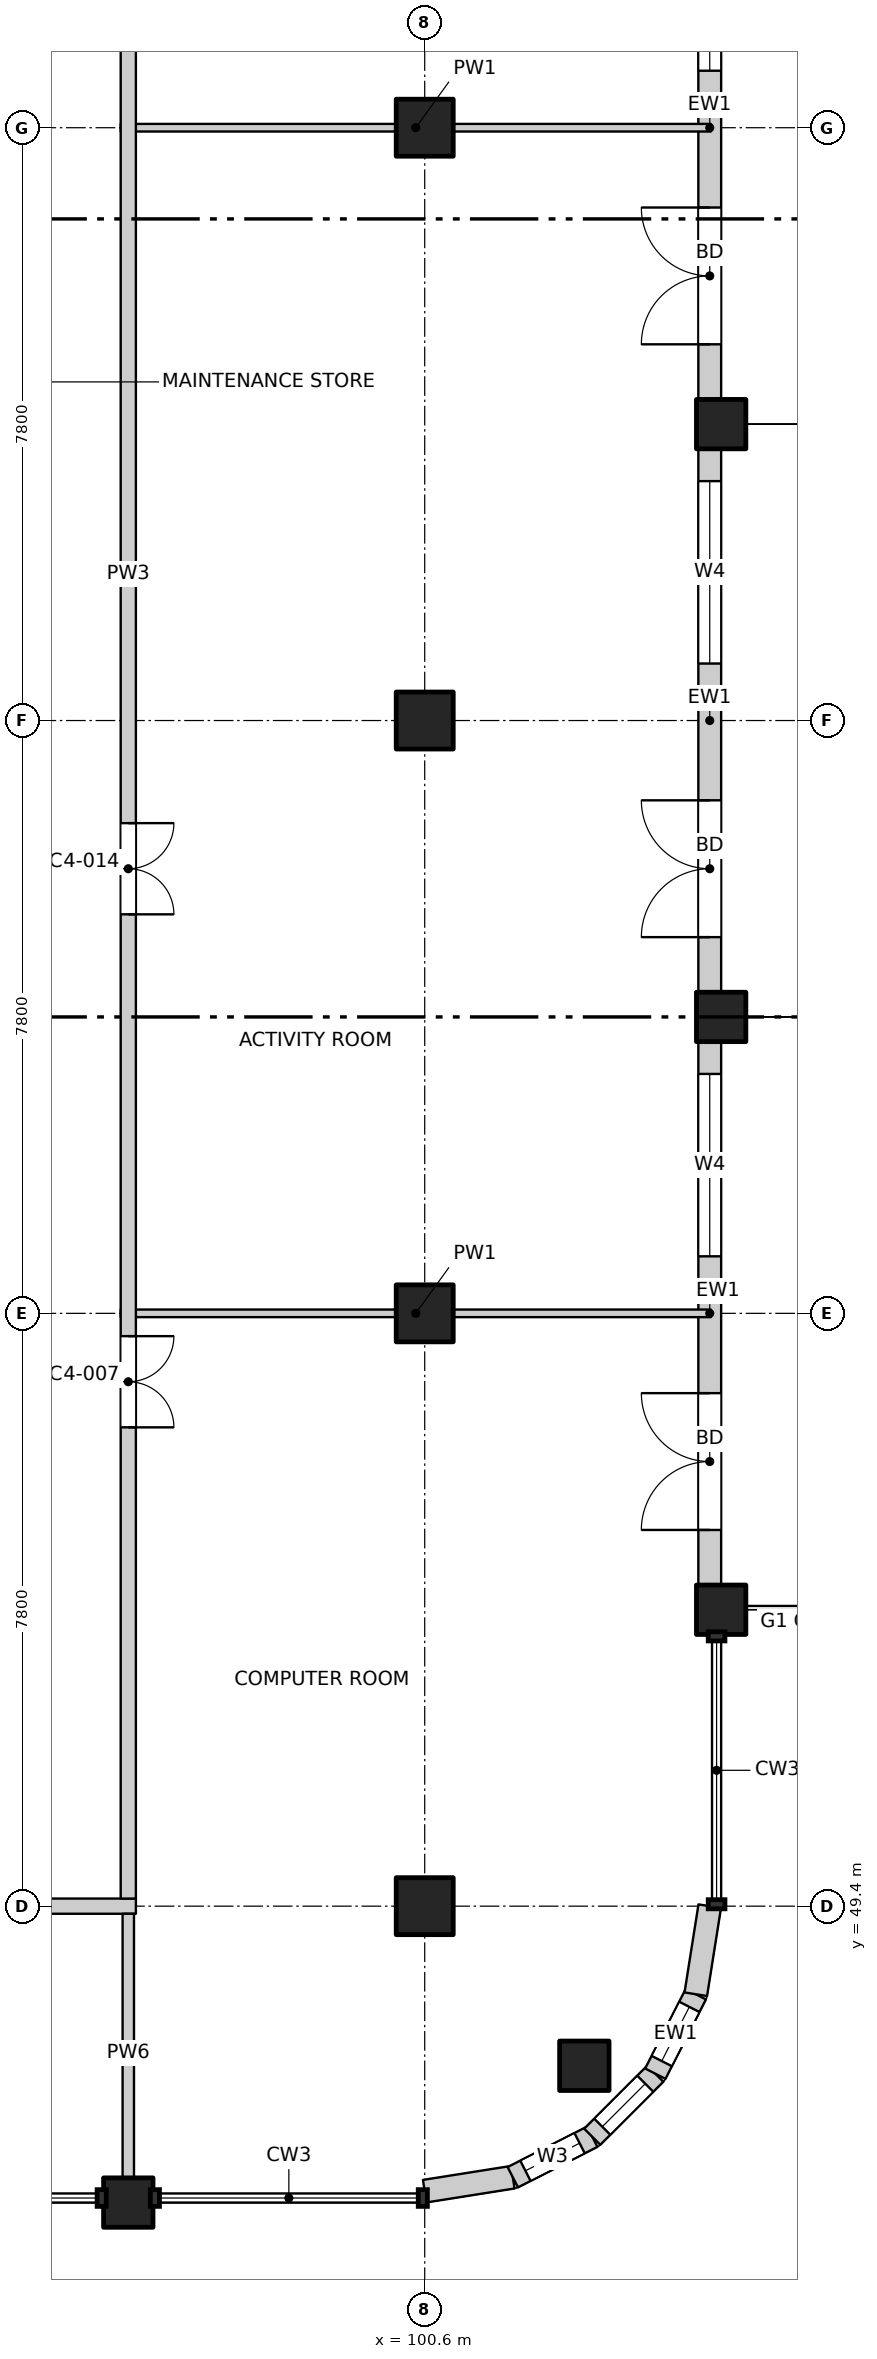
"""IFC4 building model, lengths in metres.
Left out: names, types, materials, properties, quantities, classifications, styles, units other than length and angle.
Written with IfcOpenShell. Run it as: python <this file> out.ifc"""

import sys

from ifc_helpers import new_model, si_unit, direction, frame, frame_2d, origin, origin_2d, place, context, subcontext, project, spatial, rectangle, extrude, element, fill, save


model = new_model("IFC4")
c1 = context("Model", 3, precision=1e-05, world=origin(), true_north=direction((0.0, 1.0)))
c2 = subcontext(c1, "Body", "Model", "MODEL_VIEW")
j1 = project(units=[si_unit("LENGTHUNIT", "METRE"), si_unit("PLANEANGLEUNIT", "RADIAN")], contexts=[c1])
p1 = place(None, origin())
s1 = spatial("IfcSite", under=j1, at=p1, CompositionType="ELEMENT")
p2 = place(p1, origin())
s2 = spatial("IfcBuilding", under=s1, at=p2, CompositionType="ELEMENT")
p3 = place(p2, frame((0.0, 0.0, 256.2)))
s3 = spatial("IfcBuildingStorey", under=s2, at=p3, CompositionType="ELEMENT", Elevation=256.2)
for number, where, z_axis, x_axis in (
    (1, (102.7, 47.3, -0.25), (0.0, 0.0, 1.0), (1.0, 0.0, 0.0)),
    (2, (104.5, 53.3, -0.25), (0.0, 0.0, 1.0), (1.0, 0.0, 0.0)),
    (3, (104.5, 61.1, -0.25), (0.0, 0.0, 1.0), (1.0, 0.0, 0.0)),
    (4, (104.5, 68.9, -0.25), (0.0, 0.0, 1.0), (1.0, 0.0, 0.0)),
    (5, (96.7, 45.5, -0.25), (0.0, 0.0, 1.0), (1.0, 0.0, 0.0)),
):
    element("IfcColumn", number, at=place(p3, frame(where, z_axis=z_axis, x_axis=x_axis)), inside=s3, PredefinedType="COLUMN", context=c2, shape_type="SweptSolid", body=[
        extrude(rectangle(XDim=0.65, YDim=0.65, at=origin_2d()), origin(), (0.0, 0.0, 1.0), 3.4),
    ])
for number, where, z_axis, x_axis in (
    (6, (100.6, 49.4, -0.25), (0.0, 0.0, 1.0), (1.0, 0.0, 0.0)),
    (7, (100.6, 57.2, -0.25), (0.0, 0.0, 1.0), (1.0, 0.0, 0.0)),
    (8, (100.6, 65.0, -0.25), (0.0, 0.0, 1.0), (1.0, 0.0, 0.0)),
    (9, (100.6, 72.8, -0.25), (0.0, 0.0, 1.0), (1.0, 0.0, 0.0)),
):
    element("IfcColumn", number, at=place(p3, frame(where, z_axis=z_axis, x_axis=x_axis)), inside=s3, PredefinedType="COLUMN", context=c2, shape_type="SweptSolid", body=[
        extrude(rectangle(XDim=0.75, YDim=0.75, at=origin_2d()), origin(), (0.0, 0.0, 1.0), 3.4),
    ])
p4 = place(p3, frame((104.35, 53.625, 0.0), z_axis=(0.0, 0.0, 1.0), x_axis=(0.0, 1.0, 0.0)))
e10 = element("IfcWall", 10, at=p4, inside=s3, PredefinedType="SOLIDWALL", context=c2, shape_type="SweptSolid", body=[
    extrude(rectangle(XDim=7.15, YDim=0.3, at=frame_2d((3.575, 0.0))), origin(), (0.0, 0.0, 1.0), 2.7),
])
p5 = place(p4, frame((0.725, 0.0, 0.0)))
e11 = element("IfcOpeningElement", 11, at=p5, cuts=e10, PredefinedType="OPENING", context=c2, shape_type="SweptSolid", body=[
    extrude(rectangle(XDim=1.8, YDim=2.4, at=frame_2d((0.9, 1.2))), frame((0.0, 0.16, 0.0), z_axis=(0.0, -1.0, 0.0), x_axis=(1.0, 0.0, 0.0)), (0.0, 0.0, 1.0), 0.32),
])
p6 = place(p4, frame((4.325, 0.0, 0.6)))
e12 = element("IfcOpeningElement", 12, at=p6, cuts=e10, PredefinedType="OPENING", context=c2, shape_type="SweptSolid", body=[
    extrude(rectangle(XDim=2.4, YDim=2.1, at=frame_2d((1.2, 1.05))), frame((0.0, 0.16, 0.0), z_axis=(0.0, -1.0, 0.0), x_axis=(1.0, 0.0, 0.0)), (0.0, 0.0, 1.0), 0.32),
])
p7 = place(p3, frame((104.35, 61.425, 0.0), z_axis=(0.0, 0.0, 1.0), x_axis=(0.0, 1.0, 0.0)))
e13 = element("IfcWall", 13, at=p7, inside=s3, PredefinedType="SOLIDWALL", context=c2, shape_type="SweptSolid", body=[
    extrude(rectangle(XDim=7.15, YDim=0.3, at=frame_2d((3.575, 0.0))), origin(), (0.0, 0.0, 1.0), 2.7),
])
p8 = place(p7, frame((0.725, 0.0, 0.0)))
e14 = element("IfcOpeningElement", 14, at=p8, cuts=e13, PredefinedType="OPENING", context=c2, shape_type="SweptSolid", body=[
    extrude(rectangle(XDim=1.8, YDim=2.4, at=frame_2d((0.9, 1.2))), frame((0.0, 0.16, 0.0), z_axis=(0.0, -1.0, 0.0), x_axis=(1.0, 0.0, 0.0)), (0.0, 0.0, 1.0), 0.32),
])
p9 = place(p7, frame((4.325, 0.0, 0.6)))
e15 = element("IfcOpeningElement", 15, at=p9, cuts=e13, PredefinedType="OPENING", context=c2, shape_type="SweptSolid", body=[
    extrude(rectangle(XDim=2.4, YDim=2.1, at=frame_2d((1.2, 1.05))), frame((0.0, 0.16, 0.0), z_axis=(0.0, -1.0, 0.0), x_axis=(1.0, 0.0, 0.0)), (0.0, 0.0, 1.0), 0.32),
])
p10 = place(p3, frame((104.35, 69.225, 0.0), z_axis=(0.0, 0.0, 1.0), x_axis=(0.0, 1.0, 0.0)))
e16 = element("IfcWall", 16, at=p10, inside=s3, PredefinedType="SOLIDWALL", context=c2, shape_type="SweptSolid", body=[
    extrude(rectangle(XDim=7.15, YDim=0.3, at=frame_2d((3.575, 0.0))), origin(), (0.0, 0.0, 1.0), 2.7),
])
p11 = place(p10, frame((0.725, 0.0, 0.0)))
e17 = element("IfcOpeningElement", 17, at=p11, cuts=e16, PredefinedType="OPENING", context=c2, shape_type="SweptSolid", body=[
    extrude(rectangle(XDim=1.8, YDim=2.4, at=frame_2d((0.9, 1.2))), frame((0.0, 0.16, 0.0), z_axis=(0.0, -1.0, 0.0), x_axis=(1.0, 0.0, 0.0)), (0.0, 0.0, 1.0), 0.32),
])
p12 = place(p10, frame((4.325, 0.0, 0.6)))
e18 = element("IfcOpeningElement", 18, at=p12, cuts=e16, PredefinedType="OPENING", context=c2, shape_type="SweptSolid", body=[
    extrude(rectangle(XDim=2.4, YDim=2.1, at=frame_2d((1.2, 1.05))), frame((0.0, 0.16, 0.0), z_axis=(0.0, -1.0, 0.0), x_axis=(1.0, 0.0, 0.0)), (0.0, 0.0, 1.0), 0.32),
])
p13 = place(p3, frame((100.6, 45.65, 0.0), z_axis=(0.0, 0.0, 1.0), x_axis=(0.987678452879, 0.156496880861, 0.0)))
e19 = element("IfcWall", 19, at=p13, inside=s3, PredefinedType="SOLIDWALL", context=c2, shape_type="SweptSolid", body=[
    extrude(rectangle(XDim=1.173, YDim=0.3, at=frame_2d((0.586, 0.0))), origin(), (0.0, 0.0, 1.0), 2.7),
])
p14 = place(p3, frame((101.759, 45.833, 0.0), z_axis=(0.0, 0.0, 1.0), x_axis=(0.890988677504, 0.454025524128, 0.0)))
e20 = element("IfcWall", 20, at=p14, inside=s3, PredefinedType="SOLIDWALL", context=c2, shape_type="SweptSolid", body=[
    extrude(rectangle(XDim=1.173, YDim=0.3, at=frame_2d((0.587, 0.0))), origin(), (0.0, 0.0, 1.0), 2.7),
])
p15 = place(p14, frame((0.187, 0.0, 0.9)))
e21 = element("IfcOpeningElement", 21, at=p15, cuts=e20, PredefinedType="OPENING", context=c2, shape_type="SweptSolid", body=[
    extrude(rectangle(XDim=0.8, YDim=1.2, at=frame_2d((0.4, 0.6))), frame((0.0, 0.16, 0.0), z_axis=(0.0, -1.0, 0.0), x_axis=(1.0, 0.0, 0.0)), (0.0, 0.0, 1.0), 0.32),
])
p16 = place(p3, frame((102.804, 46.366, 0.0), z_axis=(0.0, 0.0, 1.0), x_axis=(0.707106781187, 0.707106781187, 0.0)))
e22 = element("IfcWall", 22, at=p16, inside=s3, PredefinedType="SOLIDWALL", context=c2, shape_type="SweptSolid", body=[
    extrude(rectangle(XDim=1.173, YDim=0.3, at=frame_2d((0.586, 0.0))), origin(), (0.0, 0.0, 1.0), 2.7),
])
p17 = place(p16, frame((0.187, 0.0, 0.9)))
e23 = element("IfcOpeningElement", 23, at=p17, cuts=e22, PredefinedType="OPENING", context=c2, shape_type="SweptSolid", body=[
    extrude(rectangle(XDim=0.8, YDim=1.2, at=frame_2d((0.4, 0.6))), frame((0.0, 0.16, 0.0), z_axis=(0.0, -1.0, 0.0), x_axis=(1.0, 0.0, 0.0)), (0.0, 0.0, 1.0), 0.32),
])
p18 = place(p3, frame((103.634, 47.196, 0.0), z_axis=(0.0, 0.0, 1.0), x_axis=(0.454025524128, 0.890988677504, 0.0)))
e24 = element("IfcWall", 24, at=p18, inside=s3, PredefinedType="SOLIDWALL", context=c2, shape_type="SweptSolid", body=[
    extrude(rectangle(XDim=1.173, YDim=0.3, at=frame_2d((0.587, 0.0))), origin(), (0.0, 0.0, 1.0), 2.7),
])
p19 = place(p18, frame((0.187, 0.0, 0.9)))
e25 = element("IfcOpeningElement", 25, at=p19, cuts=e24, PredefinedType="OPENING", context=c2, shape_type="SweptSolid", body=[
    extrude(rectangle(XDim=0.8, YDim=1.2, at=frame_2d((0.4, 0.6))), frame((0.0, 0.16, 0.0), z_axis=(0.0, -1.0, 0.0), x_axis=(1.0, 0.0, 0.0)), (0.0, 0.0, 1.0), 0.32),
])
p20 = place(p3, frame((104.167, 48.241, 0.0), z_axis=(0.0, 0.0, 1.0), x_axis=(0.156496880861, 0.987678452879, 0.0)))
e26 = element("IfcWall", 26, at=p20, inside=s3, PredefinedType="SOLIDWALL", context=c2, shape_type="SweptSolid", body=[
    extrude(rectangle(XDim=1.173, YDim=0.3, at=frame_2d((0.586, 0.0))), origin(), (0.0, 0.0, 1.0), 2.7),
])
p21 = place(p3, frame((73.2, 49.4, 0.0), z_axis=(0.0, 0.0, 1.0), x_axis=(1.0, 0.0, 0.0)))
e27 = element("IfcWall", 27, at=p21, inside=s3, PredefinedType="PARTITIONING", context=c2, shape_type="SweptSolid", body=[
    extrude(rectangle(XDim=23.6, YDim=0.2, at=frame_2d((11.8, 0.0))), origin(), (0.0, 0.0, 1.0), 3.15),
])
p22 = place(p21, frame((5.35, 0.0, 0.0)))
e28 = element("IfcOpeningElement", 28, at=p22, cuts=e27, PredefinedType="OPENING", context=c2, shape_type="SweptSolid", body=[
    extrude(rectangle(XDim=1.2, YDim=2.1, at=frame_2d((0.6, 1.05))), frame((0.0, 0.11, 0.0), z_axis=(0.0, -1.0, 0.0), x_axis=(1.0, 0.0, 0.0)), (0.0, 0.0, 1.0), 0.22),
])
p23 = place(p21, frame((17.05, 0.0, 0.0)))
e29 = element("IfcOpeningElement", 29, at=p23, cuts=e27, PredefinedType="OPENING", context=c2, shape_type="SweptSolid", body=[
    extrude(rectangle(XDim=1.2, YDim=2.1, at=frame_2d((0.6, 1.05))), frame((0.0, 0.11, 0.0), z_axis=(0.0, -1.0, 0.0), x_axis=(1.0, 0.0, 0.0)), (0.0, 0.0, 1.0), 0.22),
])
for number, where, z_axis, x_axis in (
    (30, (96.6, 57.2, 0.0), (0.0, 0.0, 1.0), (1.0, 0.0, 0.0)),
    (31, (96.6, 72.8, 0.0), (0.0, 0.0, 1.0), (1.0, 0.0, 0.0)),
):
    element("IfcWall", number, at=place(p3, frame(where, z_axis=z_axis, x_axis=x_axis)), inside=s3, PredefinedType="PARTITIONING", context=c2, shape_type="SweptSolid", body=[
        extrude(rectangle(XDim=7.765, YDim=0.1, at=frame_2d((3.882, 0.0))), origin(), (0.0, 0.0, 1.0), 3.15),
    ])
p24 = place(p3, frame((96.7, 45.635, 0.0), z_axis=(0.0, 0.0, 1.0), x_axis=(0.0, 1.0, 0.0)))
e32 = element("IfcWall", 32, at=p24, inside=s3, PredefinedType="PARTITIONING", context=c2, shape_type="SweptSolid", body=[
    extrude(rectangle(XDim=3.665, YDim=0.15, at=frame_2d((1.833, 0.0))), origin(), (0.0, 0.0, 1.0), 3.15),
])
p25 = place(p3, frame((96.7, 49.5, 0.0), z_axis=(0.0, 0.0, 1.0), x_axis=(0.0, 1.0, 0.0)))
e33 = element("IfcWall", 33, at=p25, inside=s3, PredefinedType="PARTITIONING", context=c2, shape_type="SweptSolid", body=[
    extrude(rectangle(XDim=34.865, YDim=0.2, at=frame_2d((17.433, 0.0))), origin(), (0.0, 0.0, 1.0), 3.15),
])
p26 = place(p25, frame((6.2, 0.0, 0.0)))
e34 = element("IfcOpeningElement", 34, at=p26, cuts=e33, PredefinedType="OPENING", context=c2, shape_type="SweptSolid", body=[
    extrude(rectangle(XDim=1.2, YDim=2.1, at=frame_2d((0.6, 1.05))), frame((0.0, 0.11, 0.0), z_axis=(0.0, -1.0, 0.0), x_axis=(1.0, 0.0, 0.0)), (0.0, 0.0, 1.0), 0.22),
])
p27 = place(p25, frame((12.95, 0.0, 0.0)))
e35 = element("IfcOpeningElement", 35, at=p27, cuts=e33, PredefinedType="OPENING", context=c2, shape_type="SweptSolid", body=[
    extrude(rectangle(XDim=1.2, YDim=2.1, at=frame_2d((0.6, 1.05))), frame((0.0, 0.11, 0.0), z_axis=(0.0, -1.0, 0.0), x_axis=(1.0, 0.0, 0.0)), (0.0, 0.0, 1.0), 0.22),
])
p28 = place(p25, frame((28.55, 0.0, 0.0)))
e36 = element("IfcOpeningElement", 36, at=p28, cuts=e33, PredefinedType="OPENING", context=c2, shape_type="SweptSolid", body=[
    extrude(rectangle(XDim=1.2, YDim=2.1, at=frame_2d((0.6, 1.05))), frame((0.0, 0.11, 0.0), z_axis=(0.0, -1.0, 0.0), x_axis=(1.0, 0.0, 0.0)), (0.0, 0.0, 1.0), 0.22),
])
p29 = place(p25, frame((31.825, 0.0, 0.0)))
e37 = element("IfcOpeningElement", 37, at=p29, cuts=e33, PredefinedType="OPENING", context=c2, shape_type="SweptSolid", body=[
    extrude(rectangle(XDim=1.2, YDim=2.1, at=frame_2d((0.6, 1.05))), frame((0.0, 0.11, 0.0), z_axis=(0.0, -1.0, 0.0), x_axis=(1.0, 0.0, 0.0)), (0.0, 0.0, 1.0), 0.22),
])
p30 = place(p25, frame((33.65, 0.0, 0.0)))
e38 = element("IfcOpeningElement", 38, at=p30, cuts=e33, PredefinedType="OPENING", context=c2, shape_type="SweptSolid", body=[
    extrude(rectangle(XDim=0.9, YDim=2.1, at=frame_2d((0.45, 1.05))), frame((0.0, 0.11, 0.0), z_axis=(0.0, -1.0, 0.0), x_axis=(1.0, 0.0, 0.0)), (0.0, 0.0, 1.0), 0.22),
])
p31 = place(p5, origin())
e39 = element("IfcDoor", 39, at=p31, inside=s3, OperationType="DOUBLE_DOOR_SINGLE_SWING", PredefinedType="DOOR", context=c2, shape_type="SweptSolid", body=[
    extrude(rectangle(XDim=1.8, YDim=2.4, at=frame_2d((0.9, 1.2))), frame((0.0, 0.025, 0.0), z_axis=(0.0, -1.0, 0.0), x_axis=(1.0, 0.0, 0.0)), (0.0, 0.0, 1.0), 0.05),
])
fill(e11, e39)
p32 = place(p6, origin())
e40 = element("IfcWindow", 40, at=p32, inside=s3, PartitioningType="SINGLE_PANEL", PredefinedType="WINDOW", context=c2, shape_type="SweptSolid", body=[
    extrude(rectangle(XDim=2.4, YDim=2.1, at=frame_2d((1.2, 1.05))), frame((0.0, 0.03, 0.0), z_axis=(0.0, -1.0, 0.0), x_axis=(1.0, 0.0, 0.0)), (0.0, 0.0, 1.0), 0.06),
])
fill(e12, e40)
p33 = place(p8, origin())
e41 = element("IfcDoor", 41, at=p33, inside=s3, OperationType="DOUBLE_DOOR_SINGLE_SWING", PredefinedType="DOOR", context=c2, shape_type="SweptSolid", body=[
    extrude(rectangle(XDim=1.8, YDim=2.4, at=frame_2d((0.9, 1.2))), frame((0.0, 0.025, 0.0), z_axis=(0.0, -1.0, 0.0), x_axis=(1.0, 0.0, 0.0)), (0.0, 0.0, 1.0), 0.05),
])
fill(e14, e41)
p34 = place(p9, origin())
e42 = element("IfcWindow", 42, at=p34, inside=s3, PartitioningType="SINGLE_PANEL", PredefinedType="WINDOW", context=c2, shape_type="SweptSolid", body=[
    extrude(rectangle(XDim=2.4, YDim=2.1, at=frame_2d((1.2, 1.05))), frame((0.0, 0.03, 0.0), z_axis=(0.0, -1.0, 0.0), x_axis=(1.0, 0.0, 0.0)), (0.0, 0.0, 1.0), 0.06),
])
fill(e15, e42)
p35 = place(p11, origin())
e43 = element("IfcDoor", 43, at=p35, inside=s3, OperationType="DOUBLE_DOOR_SINGLE_SWING", PredefinedType="DOOR", context=c2, shape_type="SweptSolid", body=[
    extrude(rectangle(XDim=1.8, YDim=2.4, at=frame_2d((0.9, 1.2))), frame((0.0, 0.025, 0.0), z_axis=(0.0, -1.0, 0.0), x_axis=(1.0, 0.0, 0.0)), (0.0, 0.0, 1.0), 0.05),
])
fill(e17, e43)
p36 = place(p12, origin())
e44 = element("IfcWindow", 44, at=p36, inside=s3, PartitioningType="SINGLE_PANEL", PredefinedType="WINDOW", context=c2, shape_type="SweptSolid", body=[
    extrude(rectangle(XDim=2.4, YDim=2.1, at=frame_2d((1.2, 1.05))), frame((0.0, 0.03, 0.0), z_axis=(0.0, -1.0, 0.0), x_axis=(1.0, 0.0, 0.0)), (0.0, 0.0, 1.0), 0.06),
])
fill(e18, e44)
p37 = place(p15, origin())
e45 = element("IfcWindow", 45, at=p37, inside=s3, PartitioningType="SINGLE_PANEL", PredefinedType="WINDOW", context=c2, shape_type="SweptSolid", body=[
    extrude(rectangle(XDim=0.8, YDim=1.2, at=frame_2d((0.4, 0.6))), frame((0.0, 0.03, 0.0), z_axis=(0.0, -1.0, 0.0), x_axis=(1.0, 0.0, 0.0)), (0.0, 0.0, 1.0), 0.06),
])
fill(e21, e45)
p38 = place(p17, origin())
e46 = element("IfcWindow", 46, at=p38, inside=s3, PartitioningType="SINGLE_PANEL", PredefinedType="WINDOW", context=c2, shape_type="SweptSolid", body=[
    extrude(rectangle(XDim=0.8, YDim=1.2, at=frame_2d((0.4, 0.6))), frame((0.0, 0.03, 0.0), z_axis=(0.0, -1.0, 0.0), x_axis=(1.0, 0.0, 0.0)), (0.0, 0.0, 1.0), 0.06),
])
fill(e23, e46)
p39 = place(p19, origin())
e47 = element("IfcWindow", 47, at=p39, inside=s3, PartitioningType="SINGLE_PANEL", PredefinedType="WINDOW", context=c2, shape_type="SweptSolid", body=[
    extrude(rectangle(XDim=0.8, YDim=1.2, at=frame_2d((0.4, 0.6))), frame((0.0, 0.03, 0.0), z_axis=(0.0, -1.0, 0.0), x_axis=(1.0, 0.0, 0.0)), (0.0, 0.0, 1.0), 0.06),
])
fill(e25, e47)
p40 = place(p26, origin())
e48 = element("IfcDoor", 48, at=p40, inside=s3, OperationType="DOUBLE_DOOR_SINGLE_SWING", PredefinedType="DOOR", context=c2, shape_type="SweptSolid", body=[
    extrude(rectangle(XDim=1.2, YDim=2.1, at=frame_2d((0.6, 1.05))), frame((0.0, 0.025, 0.0), z_axis=(0.0, -1.0, 0.0), x_axis=(1.0, 0.0, 0.0)), (0.0, 0.0, 1.0), 0.05),
])
fill(e34, e48)
p41 = place(p27, origin())
e49 = element("IfcDoor", 49, at=p41, inside=s3, OperationType="DOUBLE_DOOR_SINGLE_SWING", PredefinedType="DOOR", context=c2, shape_type="SweptSolid", body=[
    extrude(rectangle(XDim=1.2, YDim=2.1, at=frame_2d((0.6, 1.05))), frame((0.0, 0.025, 0.0), z_axis=(0.0, -1.0, 0.0), x_axis=(1.0, 0.0, 0.0)), (0.0, 0.0, 1.0), 0.05),
])
fill(e35, e49)
save(model, sys.argv[1])
